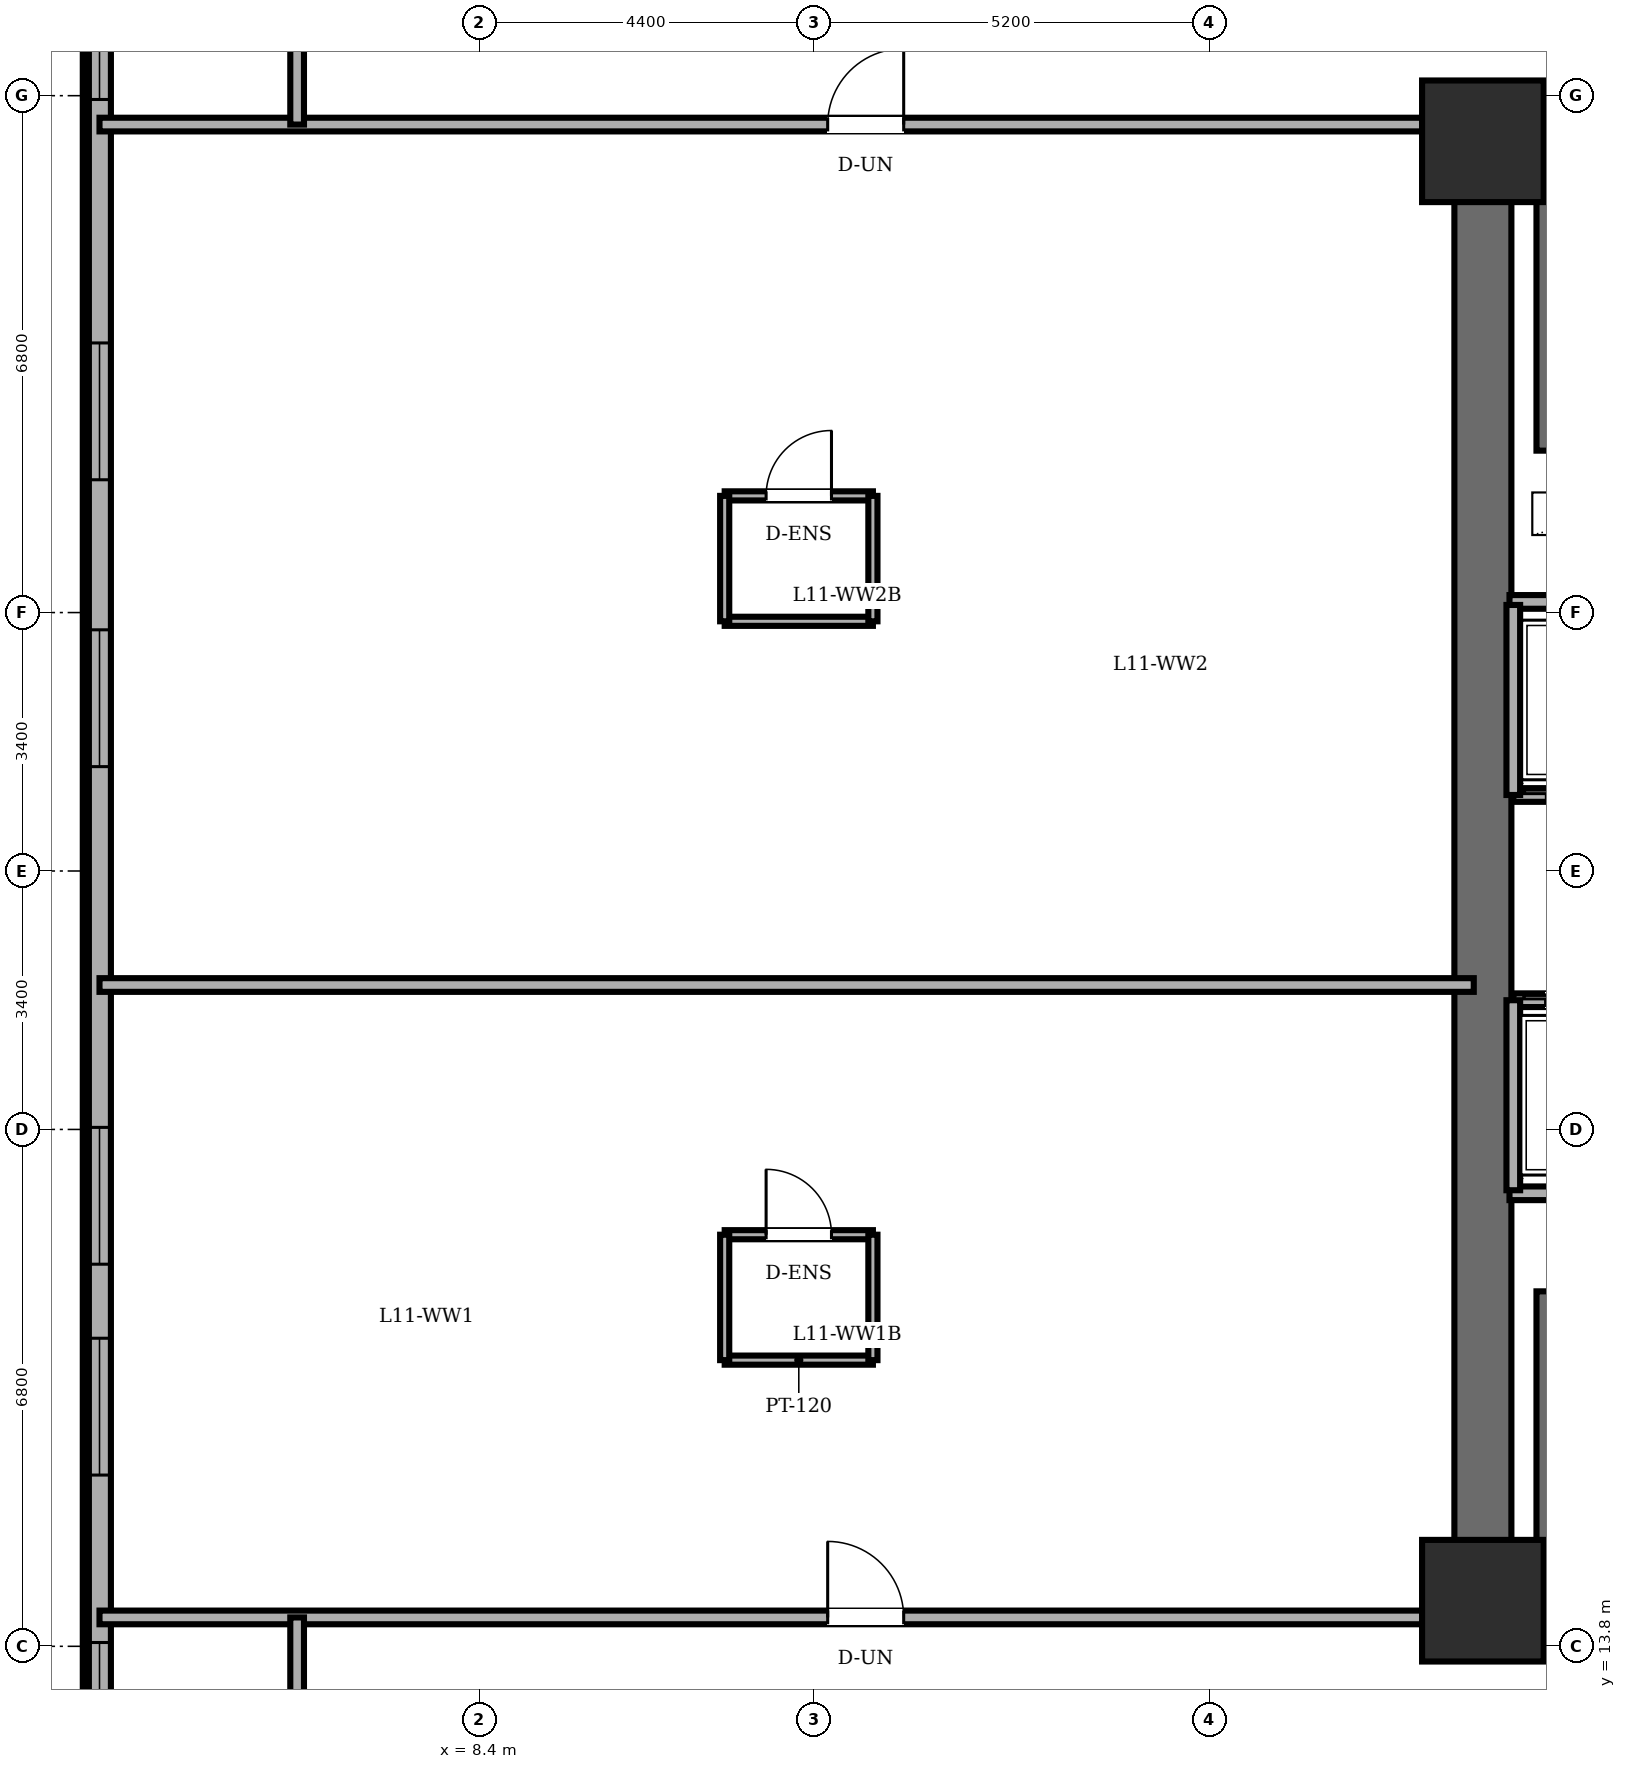
"""IFC4 building model, lengths in metres.
Left out: names, types, materials, properties, quantities, classifications, styles, units other than length and angle.
Written with IfcOpenShell. Run it as: python <this file> out.ifc"""

import sys

from ifc_helpers import new_model, si_unit, direction, frame, frame_2d, origin, origin_2d, place, context, subcontext, project, spatial, rectangle, extrude, element, fill, save


model = new_model("IFC4")
c1 = context("Model", 3, precision=1e-05, world=origin(), true_north=direction((0.0, 1.0)))
c2 = subcontext(c1, "Body", "Model", "MODEL_VIEW")
j1 = project(units=[si_unit("LENGTHUNIT", "METRE"), si_unit("PLANEANGLEUNIT", "RADIAN")], contexts=[c1])
p1 = place(None, origin())
s1 = spatial("IfcSite", under=j1, at=p1, CompositionType="ELEMENT")
p2 = place(p1, origin())
s2 = spatial("IfcBuilding", under=s1, at=p2, CompositionType="ELEMENT")
p3 = place(p2, frame((0.0, 0.0, 43.2)))
s3 = spatial("IfcBuildingStorey", under=s2, at=p3, CompositionType="ELEMENT", Elevation=43.2)
for number, where, z_axis, x_axis in (
    (1, (21.6, 14.4, 0.0), (0.0, 0.0, 1.0), (1.0, 0.0, 0.0)),
    (2, (21.6, 33.6, 0.0), (0.0, 0.0, 1.0), (1.0, 0.0, 0.0)),
):
    element("IfcColumn", number, at=place(p3, frame(where, z_axis=z_axis, x_axis=x_axis)), inside=s3, PredefinedType="COLUMN", context=c2, shape_type="SweptSolid", body=[
        extrude(rectangle(XDim=1.6, YDim=1.6, at=origin_2d()), origin(), (0.0, 0.0, 1.0), 3.6),
    ])
p4 = place(p3, frame((3.4, 40.2, 0.0), z_axis=(0.0, 0.0, 1.0), x_axis=(0.0, -1.0, 0.0)))
e3 = element("IfcWall", 3, at=p4, inside=s3, PredefinedType="SOLIDWALL", context=c2, shape_type="SweptSolid", body=[
    extrude(rectangle(XDim=32.4, YDim=0.3, at=frame_2d((16.2, 0.0))), origin(), (0.0, 0.0, 1.0), 3.4),
])
p5 = place(p4, frame((1.235, 0.0, 0.85)))
e4 = element("IfcOpeningElement", 4, at=p5, cuts=e3, PredefinedType="OPENING", context=c2, shape_type="SweptSolid", body=[
    extrude(rectangle(XDim=1.8, YDim=1.55, at=frame_2d((0.9, 0.775))), frame((0.0, 0.16, 0.0), z_axis=(0.0, -1.0, 0.0), x_axis=(1.0, 0.0, 0.0)), (0.0, 0.0, 1.0), 0.32),
])
p6 = place(p4, frame((4.25, 0.0, 0.85)))
e5 = element("IfcOpeningElement", 5, at=p6, cuts=e3, PredefinedType="OPENING", context=c2, shape_type="SweptSolid", body=[
    extrude(rectangle(XDim=1.8, YDim=1.55, at=frame_2d((0.9, 0.775))), frame((0.0, 0.16, 0.0), z_axis=(0.0, -1.0, 0.0), x_axis=(1.0, 0.0, 0.0)), (0.0, 0.0, 1.0), 0.32),
])
p7 = place(p4, frame((9.253, 0.0, 0.85)))
e6 = element("IfcOpeningElement", 6, at=p7, cuts=e3, PredefinedType="OPENING", context=c2, shape_type="SweptSolid", body=[
    extrude(rectangle(XDim=1.8, YDim=1.55, at=frame_2d((0.9, 0.775))), frame((0.0, 0.16, 0.0), z_axis=(0.0, -1.0, 0.0), x_axis=(1.0, 0.0, 0.0)), (0.0, 0.0, 1.0), 0.32),
])
p8 = place(p4, frame((13.027, 0.0, 0.85)))
e7 = element("IfcOpeningElement", 7, at=p8, cuts=e3, PredefinedType="OPENING", context=c2, shape_type="SweptSolid", body=[
    extrude(rectangle(XDim=1.8, YDim=1.55, at=frame_2d((0.9, 0.775))), frame((0.0, 0.16, 0.0), z_axis=(0.0, -1.0, 0.0), x_axis=(1.0, 0.0, 0.0)), (0.0, 0.0, 1.0), 0.32),
])
p9 = place(p4, frame((19.573, 0.0, 0.85)))
e8 = element("IfcOpeningElement", 8, at=p9, cuts=e3, PredefinedType="OPENING", context=c2, shape_type="SweptSolid", body=[
    extrude(rectangle(XDim=1.8, YDim=1.55, at=frame_2d((0.9, 0.775))), frame((0.0, 0.16, 0.0), z_axis=(0.0, -1.0, 0.0), x_axis=(1.0, 0.0, 0.0)), (0.0, 0.0, 1.0), 0.32),
])
p10 = place(p4, frame((22.347, 0.0, 0.85)))
e9 = element("IfcOpeningElement", 9, at=p10, cuts=e3, PredefinedType="OPENING", context=c2, shape_type="SweptSolid", body=[
    extrude(rectangle(XDim=1.8, YDim=1.55, at=frame_2d((0.9, 0.775))), frame((0.0, 0.16, 0.0), z_axis=(0.0, -1.0, 0.0), x_axis=(1.0, 0.0, 0.0)), (0.0, 0.0, 1.0), 0.32),
])
p11 = place(p4, frame((26.35, 0.0, 0.85)))
e10 = element("IfcOpeningElement", 10, at=p11, cuts=e3, PredefinedType="OPENING", context=c2, shape_type="SweptSolid", body=[
    extrude(rectangle(XDim=1.8, YDim=1.55, at=frame_2d((0.9, 0.775))), frame((0.0, 0.16, 0.0), z_axis=(0.0, -1.0, 0.0), x_axis=(1.0, 0.0, 0.0)), (0.0, 0.0, 1.0), 0.32),
])
p12 = place(p4, frame((29.365, 0.0, 0.85)))
e11 = element("IfcOpeningElement", 11, at=p12, cuts=e3, PredefinedType="OPENING", context=c2, shape_type="SweptSolid", body=[
    extrude(rectangle(XDim=1.8, YDim=1.55, at=frame_2d((0.9, 0.775))), frame((0.0, 0.16, 0.0), z_axis=(0.0, -1.0, 0.0), x_axis=(1.0, 0.0, 0.0)), (0.0, 0.0, 1.0), 0.32),
])
p13 = place(p3, frame((21.6, 14.4, 0.0), z_axis=(0.0, 0.0, 1.0), x_axis=(0.0, 1.0, 0.0)))
e12 = element("IfcWall", 12, at=p13, inside=s3, PredefinedType="SHEAR", context=c2, shape_type="SweptSolid", body=[
    extrude(rectangle(XDim=19.2, YDim=0.75, at=frame_2d((9.6, 0.0))), origin(), (0.0, 0.0, 1.0), 3.4),
])
for number, where, z_axis, x_axis in (
    (13, (21.6, 33.6, 0.0), (0.0, 0.0, 1.0), (1.0, 0.0, 0.0)),
    (14, (37.2, 14.4, 0.0), (0.0, 0.0, 1.0), (-1.0, 0.0, 0.0)),
):
    element("IfcWall", number, at=place(p3, frame(where, z_axis=z_axis, x_axis=x_axis)), inside=s3, PredefinedType="SHEAR", context=c2, shape_type="SweptSolid", body=[
        extrude(rectangle(XDim=15.6, YDim=0.75, at=frame_2d((7.8, 0.0))), origin(), (0.0, 0.0, 1.0), 3.4),
    ])
for number, where, z_axis, x_axis in (
    (15, (22.48, 29.53, 0.0), (0.0, 0.0, 1.0), (0.0, 1.0, 0.0)),
    (16, (22.48, 14.89, 0.0), (0.0, 0.0, 1.0), (0.0, 1.0, 0.0)),
):
    element("IfcWall", number, at=place(p3, frame(where, z_axis=z_axis, x_axis=x_axis)), inside=s3, PredefinedType="SOLIDWALL", context=c2, shape_type="SweptSolid", body=[
        extrude(rectangle(XDim=3.58, YDim=0.35, at=frame_2d((1.79, 0.0))), origin(), (0.0, 0.0, 1.0), 3.4),
    ])
p14 = place(p3, frame((21.95, 27.54, 0.0), z_axis=(0.0, 0.0, 1.0), x_axis=(1.0, 0.0, 0.0)))
e17 = element("IfcWall", 17, at=p14, inside=s3, PredefinedType="PARTITIONING", context=c2, shape_type="SweptSolid", body=[
    extrude(rectangle(XDim=10.56, YDim=0.18, at=frame_2d((5.28, 0.0))), origin(), (0.0, 0.0, 1.0), 3.4),
])
p15 = place(p3, frame((21.95, 19.76, 0.0), z_axis=(0.0, 0.0, 1.0), x_axis=(1.0, 0.0, 0.0)))
e18 = element("IfcWall", 18, at=p15, inside=s3, PredefinedType="PARTITIONING", context=c2, shape_type="SweptSolid", body=[
    extrude(rectangle(XDim=14.87, YDim=0.18, at=frame_2d((7.435, 0.0))), origin(), (0.0, 0.0, 1.0), 3.4),
])
p16 = place(p3, frame((24.02, 25.0, 0.0), z_axis=(0.0, 0.0, 1.0), x_axis=(-1.0, 0.0, 0.0)))
e19 = element("IfcWall", 19, at=p16, inside=s3, PredefinedType="PARTITIONING", context=c2, shape_type="SweptSolid", body=[
    extrude(rectangle(XDim=2.02, YDim=0.18, at=frame_2d((1.01, 0.0))), origin(), (0.0, 0.0, 1.0), 3.4),
])
p17 = place(p16, frame((0.435, 0.0, 0.0)))
e20 = element("IfcOpeningElement", 20, at=p17, cuts=e19, PredefinedType="OPENING", context=c2, shape_type="SweptSolid", body=[
    extrude(rectangle(XDim=1.15, YDim=2.2, at=frame_2d((0.575, 1.1))), frame((0.0, 0.1, 0.0), z_axis=(0.0, -1.0, 0.0), x_axis=(1.0, 0.0, 0.0)), (0.0, 0.0, 1.0), 0.2),
])
p18 = place(p3, frame((22.0, 27.5, 0.0), z_axis=(0.0, 0.0, 1.0), x_axis=(0.0, -1.0, 0.0)))
e21 = element("IfcWall", 21, at=p18, inside=s3, PredefinedType="PARTITIONING", context=c2, shape_type="SweptSolid", body=[
    extrude(rectangle(XDim=2.5, YDim=0.18, at=frame_2d((1.25, 0.0))), origin(), (0.0, 0.0, 1.0), 3.4),
])
p19 = place(p3, frame((22.0, 22.3, 0.0), z_axis=(0.0, 0.0, 1.0), x_axis=(1.0, 0.0, 0.0)))
e22 = element("IfcWall", 22, at=p19, inside=s3, PredefinedType="PARTITIONING", context=c2, shape_type="SweptSolid", body=[
    extrude(rectangle(XDim=2.0, YDim=0.18, at=frame_2d((1.0, 0.0))), origin(), (0.0, 0.0, 1.0), 3.4),
])
p20 = place(p19, frame((0.425, 0.0, 0.0)))
e23 = element("IfcOpeningElement", 23, at=p20, cuts=e22, PredefinedType="OPENING", context=c2, shape_type="SweptSolid", body=[
    extrude(rectangle(XDim=1.15, YDim=2.2, at=frame_2d((0.575, 1.1))), frame((0.0, 0.1, 0.0), z_axis=(0.0, -1.0, 0.0), x_axis=(1.0, 0.0, 0.0)), (0.0, 0.0, 1.0), 0.2),
])
p21 = place(p3, frame((22.0, 22.3, 0.0), z_axis=(0.0, 0.0, 1.0), x_axis=(0.0, -1.0, 0.0)))
e24 = element("IfcWall", 24, at=p21, inside=s3, PredefinedType="PARTITIONING", context=c2, shape_type="SweptSolid", body=[
    extrude(rectangle(XDim=2.5, YDim=0.18, at=frame_2d((1.25, 0.0))), origin(), (0.0, 0.0, 1.0), 3.4),
])
p22 = place(p3, frame((11.625, 19.215, 0.0), z_axis=(0.0, 0.0, 1.0), x_axis=(1.0, 0.0, 0.0)))
e25 = element("IfcWall", 25, at=p22, inside=s3, PredefinedType="PARTITIONING", context=c2, shape_type="SweptSolid", body=[
    extrude(rectangle(XDim=1.95, YDim=0.12, at=frame_2d((0.975, 0.0))), origin(), (0.0, 0.0, 1.0), 3.4),
])
p23 = place(p22, frame((0.545, 0.0, 0.0)))
e26 = element("IfcOpeningElement", 26, at=p23, cuts=e25, PredefinedType="OPENING", context=c2, shape_type="SweptSolid", body=[
    extrude(rectangle(XDim=0.86, YDim=2.1, at=frame_2d((0.43, 1.05))), frame((0.0, 0.07, 0.0), z_axis=(0.0, -1.0, 0.0), x_axis=(1.0, 0.0, 0.0)), (0.0, 0.0, 1.0), 0.14),
])
p24 = place(p3, frame((13.575, 17.565, 0.0), z_axis=(0.0, 0.0, 1.0), x_axis=(-1.0, 0.0, 0.0)))
e27 = element("IfcWall", 27, at=p24, inside=s3, PredefinedType="PARTITIONING", context=c2, shape_type="SweptSolid", body=[
    extrude(rectangle(XDim=1.95, YDim=0.12, at=frame_2d((0.975, 0.0))), origin(), (0.0, 0.0, 1.0), 3.4),
])
for number, where, z_axis, x_axis in (
    (28, (11.625, 19.215, 0.0), (0.0, 0.0, 1.0), (0.0, -1.0, 0.0)),
    (29, (13.575, 17.565, 0.0), (0.0, 0.0, 1.0), (0.0, 1.0, 0.0)),
):
    element("IfcWall", number, at=place(p3, frame(where, z_axis=z_axis, x_axis=x_axis)), inside=s3, PredefinedType="PARTITIONING", context=c2, shape_type="SweptSolid", body=[
        extrude(rectangle(XDim=1.65, YDim=0.12, at=frame_2d((0.825, 0.0))), origin(), (0.0, 0.0, 1.0), 3.4),
    ])
p25 = place(p3, frame((11.625, 28.935, 0.0), z_axis=(0.0, 0.0, 1.0), x_axis=(1.0, 0.0, 0.0)))
e30 = element("IfcWall", 30, at=p25, inside=s3, PredefinedType="PARTITIONING", context=c2, shape_type="SweptSolid", body=[
    extrude(rectangle(XDim=1.95, YDim=0.12, at=frame_2d((0.975, 0.0))), origin(), (0.0, 0.0, 1.0), 3.4),
])
p26 = place(p25, frame((0.545, 0.0, 0.0)))
e31 = element("IfcOpeningElement", 31, at=p26, cuts=e30, PredefinedType="OPENING", context=c2, shape_type="SweptSolid", body=[
    extrude(rectangle(XDim=0.86, YDim=2.1, at=frame_2d((0.43, 1.05))), frame((0.0, 0.07, 0.0), z_axis=(0.0, -1.0, 0.0), x_axis=(1.0, 0.0, 0.0)), (0.0, 0.0, 1.0), 0.14),
])
p27 = place(p3, frame((13.575, 27.285, 0.0), z_axis=(0.0, 0.0, 1.0), x_axis=(-1.0, 0.0, 0.0)))
e32 = element("IfcWall", 32, at=p27, inside=s3, PredefinedType="PARTITIONING", context=c2, shape_type="SweptSolid", body=[
    extrude(rectangle(XDim=1.95, YDim=0.12, at=frame_2d((0.975, 0.0))), origin(), (0.0, 0.0, 1.0), 3.4),
])
for number, where, z_axis, x_axis in (
    (33, (11.625, 28.935, 0.0), (0.0, 0.0, 1.0), (0.0, -1.0, 0.0)),
    (34, (13.575, 27.285, 0.0), (0.0, 0.0, 1.0), (0.0, 1.0, 0.0)),
):
    element("IfcWall", number, at=place(p3, frame(where, z_axis=z_axis, x_axis=x_axis)), inside=s3, PredefinedType="PARTITIONING", context=c2, shape_type="SweptSolid", body=[
        extrude(rectangle(XDim=1.65, YDim=0.12, at=frame_2d((0.825, 0.0))), origin(), (0.0, 0.0, 1.0), 3.4),
    ])
p28 = place(p3, frame((3.4, 14.18, 0.0), z_axis=(0.0, 0.0, 1.0), x_axis=(1.0, 0.0, 0.0)))
e35 = element("IfcWall", 35, at=p28, inside=s3, PredefinedType="PARTITIONING", context=c2, shape_type="SweptSolid", body=[
    extrude(rectangle(XDim=18.08, YDim=0.18, at=frame_2d((9.04, 0.0))), origin(), (0.0, 0.0, 1.0), 3.4),
])
p29 = place(p28, frame((9.58, 0.0, 0.0)))
e36 = element("IfcOpeningElement", 36, at=p29, cuts=e35, PredefinedType="OPENING", context=c2, shape_type="SweptSolid", body=[
    extrude(rectangle(XDim=1.0, YDim=2.15, at=frame_2d((0.5, 1.075))), frame((0.0, 0.1, 0.0), z_axis=(0.0, -1.0, 0.0), x_axis=(1.0, 0.0, 0.0)), (0.0, 0.0, 1.0), 0.2),
])
p30 = place(p3, frame((3.4, 22.5, 0.0), z_axis=(0.0, 0.0, 1.0), x_axis=(1.0, 0.0, 0.0)))
e37 = element("IfcWall", 37, at=p30, inside=s3, PredefinedType="PARTITIONING", context=c2, shape_type="SweptSolid", body=[
    extrude(rectangle(XDim=18.08, YDim=0.18, at=frame_2d((9.04, 0.0))), origin(), (0.0, 0.0, 1.0), 3.4),
])
p31 = place(p3, frame((3.4, 33.82, 0.0), z_axis=(0.0, 0.0, 1.0), x_axis=(1.0, 0.0, 0.0)))
e38 = element("IfcWall", 38, at=p31, inside=s3, PredefinedType="PARTITIONING", context=c2, shape_type="SweptSolid", body=[
    extrude(rectangle(XDim=18.08, YDim=0.18, at=frame_2d((9.04, 0.0))), origin(), (0.0, 0.0, 1.0), 3.4),
])
p32 = place(p31, frame((9.58, 0.0, 0.0)))
e39 = element("IfcOpeningElement", 39, at=p32, cuts=e38, PredefinedType="OPENING", context=c2, shape_type="SweptSolid", body=[
    extrude(rectangle(XDim=1.0, YDim=2.15, at=frame_2d((0.5, 1.075))), frame((0.0, 0.1, 0.0), z_axis=(0.0, -1.0, 0.0), x_axis=(1.0, 0.0, 0.0)), (0.0, 0.0, 1.0), 0.2),
])
for number, where, z_axis, x_axis in (
    (40, (6.0, 11.72, 0.0), (0.0, 0.0, 1.0), (0.0, 1.0, 0.0)),
    (41, (6.0, 33.82, 0.0), (0.0, 0.0, 1.0), (0.0, 1.0, 0.0)),
):
    element("IfcWall", number, at=place(p3, frame(where, z_axis=z_axis, x_axis=x_axis)), inside=s3, PredefinedType="PARTITIONING", context=c2, shape_type="SweptSolid", body=[
        extrude(rectangle(XDim=2.46, YDim=0.18, at=frame_2d((1.23, 0.0))), origin(), (0.0, 0.0, 1.0), 3.4),
    ])
p33 = place(p6, origin())
e42 = element("IfcWindow", 42, at=p33, inside=s3, PartitioningType="DOUBLE_PANEL_VERTICAL", PredefinedType="WINDOW", context=c2, shape_type="SweptSolid", body=[
    extrude(rectangle(XDim=1.8, YDim=1.55, at=frame_2d((0.9, 0.775))), frame((0.0, 0.03, 0.0), z_axis=(0.0, -1.0, 0.0), x_axis=(1.0, 0.0, 0.0)), (0.0, 0.0, 1.0), 0.06),
])
fill(e5, e42)
p34 = place(p7, origin())
e43 = element("IfcWindow", 43, at=p34, inside=s3, PartitioningType="DOUBLE_PANEL_VERTICAL", PredefinedType="WINDOW", context=c2, shape_type="SweptSolid", body=[
    extrude(rectangle(XDim=1.8, YDim=1.55, at=frame_2d((0.9, 0.775))), frame((0.0, 0.03, 0.0), z_axis=(0.0, -1.0, 0.0), x_axis=(1.0, 0.0, 0.0)), (0.0, 0.0, 1.0), 0.06),
])
fill(e6, e43)
p35 = place(p8, origin())
e44 = element("IfcWindow", 44, at=p35, inside=s3, PartitioningType="DOUBLE_PANEL_VERTICAL", PredefinedType="WINDOW", context=c2, shape_type="SweptSolid", body=[
    extrude(rectangle(XDim=1.8, YDim=1.55, at=frame_2d((0.9, 0.775))), frame((0.0, 0.03, 0.0), z_axis=(0.0, -1.0, 0.0), x_axis=(1.0, 0.0, 0.0)), (0.0, 0.0, 1.0), 0.06),
])
fill(e7, e44)
p36 = place(p9, origin())
e45 = element("IfcWindow", 45, at=p36, inside=s3, PartitioningType="DOUBLE_PANEL_VERTICAL", PredefinedType="WINDOW", context=c2, shape_type="SweptSolid", body=[
    extrude(rectangle(XDim=1.8, YDim=1.55, at=frame_2d((0.9, 0.775))), frame((0.0, 0.03, 0.0), z_axis=(0.0, -1.0, 0.0), x_axis=(1.0, 0.0, 0.0)), (0.0, 0.0, 1.0), 0.06),
])
fill(e8, e45)
p37 = place(p10, origin())
e46 = element("IfcWindow", 46, at=p37, inside=s3, PartitioningType="DOUBLE_PANEL_VERTICAL", PredefinedType="WINDOW", context=c2, shape_type="SweptSolid", body=[
    extrude(rectangle(XDim=1.8, YDim=1.55, at=frame_2d((0.9, 0.775))), frame((0.0, 0.03, 0.0), z_axis=(0.0, -1.0, 0.0), x_axis=(1.0, 0.0, 0.0)), (0.0, 0.0, 1.0), 0.06),
])
fill(e9, e46)
p38 = place(p11, origin())
e47 = element("IfcWindow", 47, at=p38, inside=s3, PartitioningType="DOUBLE_PANEL_VERTICAL", PredefinedType="WINDOW", context=c2, shape_type="SweptSolid", body=[
    extrude(rectangle(XDim=1.8, YDim=1.55, at=frame_2d((0.9, 0.775))), frame((0.0, 0.03, 0.0), z_axis=(0.0, -1.0, 0.0), x_axis=(1.0, 0.0, 0.0)), (0.0, 0.0, 1.0), 0.06),
])
fill(e10, e47)
p39 = place(p20, origin())
e48 = element("IfcDoor", 48, at=p39, inside=s3, OperationType="DOUBLE_DOOR_SLIDING", PredefinedType="DOOR", context=c2, shape_type="SweptSolid", body=[
    extrude(rectangle(XDim=1.15, YDim=2.2, at=frame_2d((0.575, 1.1))), frame((0.0, 0.025, 0.0), z_axis=(0.0, -1.0, 0.0), x_axis=(1.0, 0.0, 0.0)), (0.0, 0.0, 1.0), 0.05),
])
fill(e23, e48)
p40 = place(p23, origin())
e49 = element("IfcDoor", 49, at=p40, inside=s3, OperationType="SINGLE_SWING_LEFT", PredefinedType="DOOR", context=c2, shape_type="SweptSolid", body=[
    extrude(rectangle(XDim=0.86, YDim=2.1, at=frame_2d((0.43, 1.05))), frame((0.0, 0.025, 0.0), z_axis=(0.0, -1.0, 0.0), x_axis=(1.0, 0.0, 0.0)), (0.0, 0.0, 1.0), 0.05),
])
fill(e26, e49)
p41 = place(p26, origin())
e50 = element("IfcDoor", 50, at=p41, inside=s3, OperationType="SINGLE_SWING_RIGHT", PredefinedType="DOOR", context=c2, shape_type="SweptSolid", body=[
    extrude(rectangle(XDim=0.86, YDim=2.1, at=frame_2d((0.43, 1.05))), frame((0.0, 0.025, 0.0), z_axis=(0.0, -1.0, 0.0), x_axis=(1.0, 0.0, 0.0)), (0.0, 0.0, 1.0), 0.05),
])
fill(e31, e50)
p42 = place(p29, origin())
e51 = element("IfcDoor", 51, at=p42, inside=s3, OperationType="SINGLE_SWING_LEFT", PredefinedType="DOOR", context=c2, shape_type="SweptSolid", body=[
    extrude(rectangle(XDim=1.0, YDim=2.15, at=frame_2d((0.5, 1.075))), frame((0.0, 0.025, 0.0), z_axis=(0.0, -1.0, 0.0), x_axis=(1.0, 0.0, 0.0)), (0.0, 0.0, 1.0), 0.05),
])
fill(e36, e51)
p43 = place(p32, origin())
e52 = element("IfcDoor", 52, at=p43, inside=s3, OperationType="SINGLE_SWING_RIGHT", PredefinedType="DOOR", context=c2, shape_type="SweptSolid", body=[
    extrude(rectangle(XDim=1.0, YDim=2.15, at=frame_2d((0.5, 1.075))), frame((0.0, 0.025, 0.0), z_axis=(0.0, -1.0, 0.0), x_axis=(1.0, 0.0, 0.0)), (0.0, 0.0, 1.0), 0.05),
])
fill(e39, e52)
save(model, sys.argv[1])
